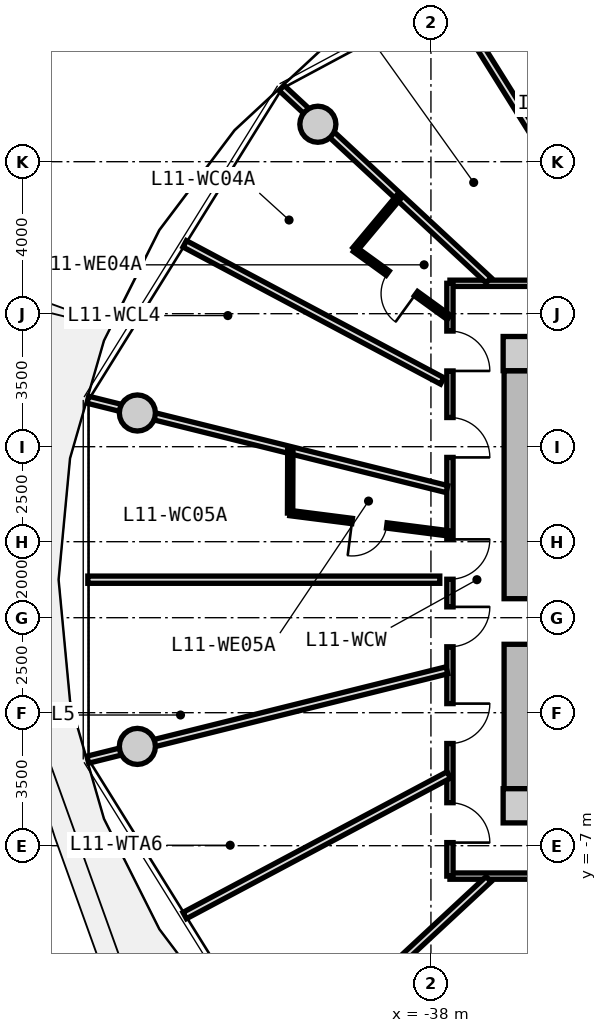
"""IFC4 building model, lengths in metres.
Left out: names, types, materials, properties, quantities, classifications, styles, units other than length and angle.
Written with IfcOpenShell. Run it as: python <this file> out.ifc"""

import sys

from ifc_helpers import new_model, si_unit, direction, frame, frame_2d, origin, origin_2d, place, context, subcontext, project, spatial, rectangle, circle, extrude, source, transform, mapped, element, fill, save


model = new_model("IFC4")
c1 = context("Model", 3, precision=1e-05, world=origin(), true_north=direction((0.0, 1.0)))
c2 = subcontext(c1, "Body", "Model", "MODEL_VIEW")
j1 = project(units=[si_unit("LENGTHUNIT", "METRE"), si_unit("PLANEANGLEUNIT", "RADIAN")], contexts=[c1])
p1 = place(None, origin())
s1 = spatial("IfcSite", under=j1, at=p1, CompositionType="ELEMENT")
p2 = place(p1, origin())
s2 = spatial("IfcBuilding", under=s1, at=p2, CompositionType="ELEMENT")
p3 = place(p2, frame((0.0, 0.0, 39.9)))
s3 = spatial("IfcBuildingStorey", under=s2, at=p3, CompositionType="ELEMENT", Elevation=39.9)
m1 = source(origin(), c2, "Body", "SweptSolid", [
    extrude(rectangle(XDim=0.9, YDim=0.9, at=origin_2d()), origin(), (0.0, 0.0, 1.0), 3.05),
])
for number, where, z_axis, x_axis in (
    (1, (-35.65, -5.95, 0.0), (0.0, 0.0, 1.0), (1.0, 0.0, 0.0)),
    (2, (-35.65, 5.95, 0.0), (0.0, 0.0, 1.0), (1.0, 0.0, 0.0)),
):
    element("IfcColumn", number, at=place(p3, frame(where, z_axis=z_axis, x_axis=x_axis)), inside=s3, PredefinedType="COLUMN", context=c2, shape_type="MappedRepresentation", body=[
        mapped(m1, transform((0.0, 0.0, 0.0), x_axis=(1.0, 0.0, 0.0), y_axis=(0.0, 1.0, 0.0), z_axis=(0.0, 0.0, 1.0), scale=1.0)),
    ])
m2 = source(origin(), c2, "Body", "SweptSolid", [
    extrude(rectangle(XDim=11.0, YDim=0.85, at=frame_2d((5.5, 0.0))), origin(), (0.0, 0.0, 1.0), 2.79),
])
p4 = place(p3, frame((-35.65, -5.5, 0.0), z_axis=(0.0, 0.0, 1.0), x_axis=(0.0, 1.0, 0.0)))
e3 = element("IfcWall", 3, at=p4, inside=s3, PredefinedType="SHEAR", context=c2, shape_type="MappedRepresentation", body=[
    mapped(m2, transform((0.0, 0.0, 0.0), x_axis=(1.0, 0.0, 0.0), y_axis=(0.0, 1.0, 0.0), z_axis=(0.0, 0.0, 1.0), scale=1.0)),
])
p5 = place(p4, frame((3.8, 0.0, 0.0)))
e4 = element("IfcOpeningElement", 4, at=p5, cuts=e3, PredefinedType="OPENING", context=c2, shape_type="SweptSolid", body=[
    extrude(rectangle(XDim=1.2, YDim=2.15, at=frame_2d((0.6, 1.075))), frame((0.0, 0.435, 0.0), z_axis=(0.0, -1.0, 0.0), x_axis=(1.0, 0.0, 0.0)), (0.0, 0.0, 1.0), 0.87),
])
m3 = source(origin(), c2, "Body", "SweptSolid", [
    extrude(circle(Radius=0.475, at=origin_2d()), origin(), (0.0, 0.0, 1.0), 3.05),
])
for number, where, z_axis, x_axis in (
    (5, (-40.975, 11.985, 0.0), (0.0, 0.0, 1.0), (1.0, 0.0, 0.0)),
    (6, (-45.725, 4.387, 0.0), (0.0, 0.0, 1.0), (1.0, 0.0, 0.0)),
    (7, (-45.725, -4.387, 0.0), (0.0, 0.0, 1.0), (1.0, 0.0, 0.0)),
):
    element("IfcColumn", number, at=place(p3, frame(where, z_axis=z_axis, x_axis=x_axis)), inside=s3, PredefinedType="COLUMN", context=c2, shape_type="MappedRepresentation", body=[
        mapped(m3, transform((0.0, 0.0, 0.0), x_axis=(1.0, 0.0, 0.0), y_axis=(0.0, 1.0, 0.0), z_axis=(0.0, 0.0, 1.0), scale=1.0)),
    ])
m4 = source(origin(), c2, "Body", "SweptSolid", [
    extrude(rectangle(XDim=19.0, YDim=0.165, at=frame_2d((9.5, 0.0))), origin(), (0.0, 0.0, 1.0), 2.775),
])
p6 = place(p3, frame((-37.5, 7.8, 0.0), z_axis=(0.0, 0.0, 1.0), x_axis=(1.0, 0.0, 0.0)))
e8 = element("IfcWall", 8, at=p6, inside=s3, PredefinedType="PARTITIONING", context=c2, shape_type="MappedRepresentation", body=[
    mapped(m4, transform((0.0, 0.0, 0.0), x_axis=(1.0, 0.0, 0.0), y_axis=(0.0, 1.0, 0.0), z_axis=(0.0, 0.0, 1.0), scale=1.0)),
])
p7 = place(p6, frame((4.773, 0.0, 0.0)))
e9 = element("IfcOpeningElement", 9, at=p7, cuts=e8, PredefinedType="OPENING", context=c2, shape_type="SweptSolid", body=[
    extrude(rectangle(XDim=1.05, YDim=2.15, at=frame_2d((0.525, 1.075))), frame((0.0, 0.093, 0.0), z_axis=(0.0, -1.0, 0.0), x_axis=(1.0, 0.0, 0.0)), (0.0, 0.0, 1.0), 0.185),
])
p8 = place(p6, frame((2.251, 0.0, 0.0)))
e10 = element("IfcOpeningElement", 10, at=p8, cuts=e8, PredefinedType="OPENING", context=c2, shape_type="SweptSolid", body=[
    extrude(rectangle(XDim=1.05, YDim=2.15, at=frame_2d((0.525, 1.075))), frame((0.0, 0.093, 0.0), z_axis=(0.0, -1.0, 0.0), x_axis=(1.0, 0.0, 0.0)), (0.0, 0.0, 1.0), 0.185),
])
p9 = place(p6, frame((14.653, 0.0, 0.0)))
e11 = element("IfcOpeningElement", 11, at=p9, cuts=e8, PredefinedType="OPENING", context=c2, shape_type="SweptSolid", body=[
    extrude(rectangle(XDim=1.05, YDim=2.15, at=frame_2d((0.525, 1.075))), frame((0.0, 0.093, 0.0), z_axis=(0.0, -1.0, 0.0), x_axis=(1.0, 0.0, 0.0)), (0.0, 0.0, 1.0), 0.185),
])
p10 = place(p6, frame((12.5, 0.0, 0.0)))
e12 = element("IfcOpeningElement", 12, at=p10, cuts=e8, PredefinedType="OPENING", context=c2, shape_type="SweptSolid", body=[
    extrude(rectangle(XDim=1.05, YDim=2.15, at=frame_2d((0.525, 1.075))), frame((0.0, 0.093, 0.0), z_axis=(0.0, -1.0, 0.0), x_axis=(1.0, 0.0, 0.0)), (0.0, 0.0, 1.0), 0.185),
])
p11 = place(p6, frame((9.352, 0.0, 0.0)))
e13 = element("IfcOpeningElement", 13, at=p11, cuts=e8, PredefinedType="OPENING", context=c2, shape_type="SweptSolid", body=[
    extrude(rectangle(XDim=1.05, YDim=2.15, at=frame_2d((0.525, 1.075))), frame((0.0, 0.093, 0.0), z_axis=(0.0, -1.0, 0.0), x_axis=(1.0, 0.0, 0.0)), (0.0, 0.0, 1.0), 0.185),
])
p12 = place(p6, frame((7.806, 0.0, 0.0)))
e14 = element("IfcOpeningElement", 14, at=p12, cuts=e8, PredefinedType="OPENING", context=c2, shape_type="SweptSolid", body=[
    extrude(rectangle(XDim=1.05, YDim=2.15, at=frame_2d((0.525, 1.075))), frame((0.0, 0.093, 0.0), z_axis=(0.0, -1.0, 0.0), x_axis=(1.0, 0.0, 0.0)), (0.0, 0.0, 1.0), 0.185),
])
p13 = place(p3, frame((-18.5, -7.8, 0.0), z_axis=(0.0, 0.0, 1.0), x_axis=(-1.0, 0.0, 0.0)))
e15 = element("IfcWall", 15, at=p13, inside=s3, PredefinedType="PARTITIONING", context=c2, shape_type="MappedRepresentation", body=[
    mapped(m4, transform((0.0, 0.0, 0.0), x_axis=(1.0, 0.0, 0.0), y_axis=(0.0, 1.0, 0.0), z_axis=(0.0, 0.0, 1.0), scale=1.0)),
])
p14 = place(p13, frame((15.652, 0.0, 0.0)))
e16 = element("IfcOpeningElement", 16, at=p14, cuts=e15, PredefinedType="OPENING", context=c2, shape_type="SweptSolid", body=[
    extrude(rectangle(XDim=1.05, YDim=2.15, at=frame_2d((0.525, 1.075))), frame((0.0, 0.093, 0.0), z_axis=(0.0, -1.0, 0.0), x_axis=(1.0, 0.0, 0.0)), (0.0, 0.0, 1.0), 0.185),
])
p15 = place(p13, frame((12.5, 0.0, 0.0)))
e17 = element("IfcOpeningElement", 17, at=p15, cuts=e15, PredefinedType="OPENING", context=c2, shape_type="SweptSolid", body=[
    extrude(rectangle(XDim=1.05, YDim=2.15, at=frame_2d((0.525, 1.075))), frame((0.0, 0.093, 0.0), z_axis=(0.0, -1.0, 0.0), x_axis=(1.0, 0.0, 0.0)), (0.0, 0.0, 1.0), 0.185),
])
p16 = place(p13, frame((10.104, 0.0, 0.0)))
e18 = element("IfcOpeningElement", 18, at=p16, cuts=e15, PredefinedType="OPENING", context=c2, shape_type="SweptSolid", body=[
    extrude(rectangle(XDim=1.05, YDim=2.15, at=frame_2d((0.525, 1.075))), frame((0.0, 0.093, 0.0), z_axis=(0.0, -1.0, 0.0), x_axis=(1.0, 0.0, 0.0)), (0.0, 0.0, 1.0), 0.185),
])
p17 = place(p13, frame((7.806, 0.0, 0.0)))
e19 = element("IfcOpeningElement", 19, at=p17, cuts=e15, PredefinedType="OPENING", context=c2, shape_type="SweptSolid", body=[
    extrude(rectangle(XDim=1.05, YDim=2.15, at=frame_2d((0.525, 1.075))), frame((0.0, 0.093, 0.0), z_axis=(0.0, -1.0, 0.0), x_axis=(1.0, 0.0, 0.0)), (0.0, 0.0, 1.0), 0.185),
])
p18 = place(p13, frame((5.915, 0.0, 0.0)))
e20 = element("IfcOpeningElement", 20, at=p18, cuts=e15, PredefinedType="OPENING", context=c2, shape_type="SweptSolid", body=[
    extrude(rectangle(XDim=0.92, YDim=2.1, at=frame_2d((0.46, 1.05))), frame((0.0, 0.093, 0.0), z_axis=(0.0, -1.0, 0.0), x_axis=(1.0, 0.0, 0.0)), (0.0, 0.0, 1.0), 0.185),
])
p19 = place(p13, frame((2.769, 0.0, 0.0)))
e21 = element("IfcOpeningElement", 21, at=p19, cuts=e15, PredefinedType="OPENING", context=c2, shape_type="SweptSolid", body=[
    extrude(rectangle(XDim=0.92, YDim=2.1, at=frame_2d((0.46, 1.05))), frame((0.0, 0.093, 0.0), z_axis=(0.0, -1.0, 0.0), x_axis=(1.0, 0.0, 0.0)), (0.0, 0.0, 1.0), 0.185),
])
m5 = source(origin(), c2, "Body", "SweptSolid", [
    extrude(rectangle(XDim=15.6, YDim=0.165, at=frame_2d((7.8, 0.0))), origin(), (0.0, 0.0, 1.0), 2.775),
])
p20 = place(p3, frame((-37.5, -7.8, 0.0), z_axis=(0.0, 0.0, 1.0), x_axis=(0.0, 1.0, 0.0)))
e22 = element("IfcWall", 22, at=p20, inside=s3, PredefinedType="PARTITIONING", context=c2, shape_type="MappedRepresentation", body=[
    mapped(m5, transform((0.0, 0.0, 0.0), x_axis=(1.0, 0.0, 0.0), y_axis=(0.0, 1.0, 0.0), z_axis=(0.0, 0.0, 1.0), scale=1.0)),
])
p21 = place(p20, frame((13.293, 0.0, 0.0)))
e23 = element("IfcOpeningElement", 23, at=p21, cuts=e22, PredefinedType="OPENING", context=c2, shape_type="SweptSolid", body=[
    extrude(rectangle(XDim=1.05, YDim=2.15, at=frame_2d((0.525, 1.075))), frame((0.0, 0.093, 0.0), z_axis=(0.0, -1.0, 0.0), x_axis=(1.0, 0.0, 0.0)), (0.0, 0.0, 1.0), 0.185),
])
p22 = place(p20, frame((11.018, 0.0, 0.0)))
e24 = element("IfcOpeningElement", 24, at=p22, cuts=e22, PredefinedType="OPENING", context=c2, shape_type="SweptSolid", body=[
    extrude(rectangle(XDim=1.05, YDim=2.15, at=frame_2d((0.525, 1.075))), frame((0.0, 0.093, 0.0), z_axis=(0.0, -1.0, 0.0), x_axis=(1.0, 0.0, 0.0)), (0.0, 0.0, 1.0), 0.185),
])
p23 = place(p20, frame((7.812, 0.0, 0.0)))
e25 = element("IfcOpeningElement", 25, at=p23, cuts=e22, PredefinedType="OPENING", context=c2, shape_type="SweptSolid", body=[
    extrude(rectangle(XDim=1.05, YDim=2.15, at=frame_2d((0.525, 1.075))), frame((0.0, 0.093, 0.0), z_axis=(0.0, -1.0, 0.0), x_axis=(1.0, 0.0, 0.0)), (0.0, 0.0, 1.0), 0.185),
])
p24 = place(p20, frame((6.035, 0.0, 0.0)))
e26 = element("IfcOpeningElement", 26, at=p24, cuts=e22, PredefinedType="OPENING", context=c2, shape_type="SweptSolid", body=[
    extrude(rectangle(XDim=1.05, YDim=2.15, at=frame_2d((0.525, 1.075))), frame((0.0, 0.093, 0.0), z_axis=(0.0, -1.0, 0.0), x_axis=(1.0, 0.0, 0.0)), (0.0, 0.0, 1.0), 0.185),
])
p25 = place(p20, frame((3.489, 0.0, 0.0)))
e27 = element("IfcOpeningElement", 27, at=p25, cuts=e22, PredefinedType="OPENING", context=c2, shape_type="SweptSolid", body=[
    extrude(rectangle(XDim=1.05, YDim=2.15, at=frame_2d((0.525, 1.075))), frame((0.0, 0.093, 0.0), z_axis=(0.0, -1.0, 0.0), x_axis=(1.0, 0.0, 0.0)), (0.0, 0.0, 1.0), 0.185),
])
p26 = place(p20, frame((0.882, 0.0, 0.0)))
e28 = element("IfcOpeningElement", 28, at=p26, cuts=e22, PredefinedType="OPENING", context=c2, shape_type="SweptSolid", body=[
    extrude(rectangle(XDim=1.05, YDim=2.15, at=frame_2d((0.525, 1.075))), frame((0.0, 0.093, 0.0), z_axis=(0.0, -1.0, 0.0), x_axis=(1.0, 0.0, 0.0)), (0.0, 0.0, 1.0), 0.185),
])
m6 = source(origin(), c2, "Body", "SweptSolid", [
    extrude(rectangle(XDim=7.435, YDim=0.19, at=frame_2d((3.717, 0.0))), origin(), (0.0, 0.0, 1.0), 2.225),
])
p27 = place(p3, frame((-36.483, 7.88, 0.0), z_axis=(0.0, 0.0, 1.0), x_axis=(-0.732651956848, 0.680603489652, 0.0)))
e29 = element("IfcWall", 29, at=p27, inside=s3, PredefinedType="PARTITIONING", context=c2, shape_type="MappedRepresentation", body=[
    mapped(m6, transform((0.0, 0.0, 0.0), x_axis=(1.0, 0.0, 0.0), y_axis=(0.0, 1.0, 0.0), z_axis=(0.0, 0.0, 1.0), scale=1.0)),
])
m7 = source(origin(), c2, "Body", "SweptSolid", [
    extrude(rectangle(XDim=8.598, YDim=0.19, at=frame_2d((4.299, 0.0))), origin(), (0.0, 0.0, 1.0), 2.775),
])
p28 = place(p3, frame((-32.957, 8.017, 0.0), z_axis=(0.0, 0.0, 1.0), x_axis=(-0.530039776395, 0.847972779893, 0.0)))
e30 = element("IfcWall", 30, at=p28, inside=s3, PredefinedType="PARTITIONING", context=c2, shape_type="MappedRepresentation", body=[
    mapped(m7, transform((0.0, 0.0, 0.0), x_axis=(1.0, 0.0, 0.0), y_axis=(0.0, 1.0, 0.0), z_axis=(0.0, 0.0, 1.0), scale=1.0)),
])
m8 = source(origin(), c2, "Body", "SweptSolid", [
    extrude(rectangle(XDim=9.737, YDim=0.19, at=frame_2d((4.869, 0.0))), origin(), (0.0, 0.0, 1.0), 2.225),
])
p29 = place(p3, frame((-37.58, 2.385, 0.0), z_axis=(0.0, 0.0, 1.0), x_axis=(-0.970392716238, 0.241532557375, 0.0)))
e31 = element("IfcWall", 31, at=p29, inside=s3, PredefinedType="PARTITIONING", context=c2, shape_type="MappedRepresentation", body=[
    mapped(m8, transform((0.0, 0.0, 0.0), x_axis=(1.0, 0.0, 0.0), y_axis=(0.0, 1.0, 0.0), z_axis=(0.0, 0.0, 1.0), scale=1.0)),
])
m9 = source(origin(), c2, "Body", "SweptSolid", [
    extrude(rectangle(XDim=7.677, YDim=0.19, at=frame_2d((3.838, 0.0))), origin(), (0.0, 0.0, 1.0), 2.775),
])
p30 = place(p3, frame((-37.703, 5.231, 0.0), z_axis=(0.0, 0.0, 1.0), x_axis=(-0.882725057546, 0.469889851753, 0.0)))
e32 = element("IfcWall", 32, at=p30, inside=s3, PredefinedType="PARTITIONING", context=c2, shape_type="MappedRepresentation", body=[
    mapped(m9, transform((0.0, 0.0, 0.0), x_axis=(1.0, 0.0, 0.0), y_axis=(0.0, 1.0, 0.0), z_axis=(0.0, 0.0, 1.0), scale=1.0)),
])
m10 = source(origin(), c2, "Body", "SweptSolid", [
    extrude(rectangle(XDim=3.051, YDim=0.14, at=frame_2d((1.525, 0.0))), origin(), (0.0, 0.0, 1.0), 2.775),
])
p31 = place(p3, frame((-37.53, 6.903, 0.0), z_axis=(0.0, 0.0, 1.0), x_axis=(-0.809849031404, 0.586638343729, 0.0)))
e33 = element("IfcWall", 33, at=p31, inside=s3, PredefinedType="PARTITIONING", context=c2, shape_type="MappedRepresentation", body=[
    mapped(m10, transform((0.0, 0.0, 0.0), x_axis=(1.0, 0.0, 0.0), y_axis=(0.0, 1.0, 0.0), z_axis=(0.0, 0.0, 1.0), scale=1.0)),
])
p32 = place(p31, frame((1.065, 0.0, 0.0)))
e34 = element("IfcOpeningElement", 34, at=p32, cuts=e33, PredefinedType="OPENING", context=c2, shape_type="SweptSolid", body=[
    extrude(rectangle(XDim=0.92, YDim=2.1, at=frame_2d((0.46, 1.05))), frame((0.0, 0.08, 0.0), z_axis=(0.0, -1.0, 0.0), x_axis=(1.0, 0.0, 0.0)), (0.0, 0.0, 1.0), 0.16),
])
m11 = source(origin(), c2, "Body", "SweptSolid", [
    extrude(rectangle(XDim=1.84, YDim=0.14, at=frame_2d((0.92, 0.0))), origin(), (0.0, 0.0, 1.0), 2.415),
])
p33 = place(p3, frame((-40.0, 8.692, 0.0), z_axis=(0.0, 0.0, 1.0), x_axis=(0.641410397049, 0.767197955262, 0.0)))
e35 = element("IfcWall", 35, at=p33, inside=s3, PredefinedType="PARTITIONING", context=c2, shape_type="MappedRepresentation", body=[
    mapped(m11, transform((0.0, 0.0, 0.0), x_axis=(1.0, 0.0, 0.0), y_axis=(0.0, 1.0, 0.0), z_axis=(0.0, 0.0, 1.0), scale=1.0)),
])
p34 = place(p3, frame((-37.58, -2.385, 0.0), z_axis=(0.0, 0.0, 1.0), x_axis=(-0.970392716238, -0.241532557375, 0.0)))
e36 = element("IfcWall", 36, at=p34, inside=s3, PredefinedType="PARTITIONING", context=c2, shape_type="MappedRepresentation", body=[
    mapped(m8, transform((0.0, 0.0, 0.0), x_axis=(1.0, 0.0, 0.0), y_axis=(0.0, 1.0, 0.0), z_axis=(0.0, 0.0, 1.0), scale=1.0)),
])
m12 = source(origin(), c2, "Body", "SweptSolid", [
    extrude(rectangle(XDim=9.261, YDim=0.19, at=frame_2d((4.631, 0.0))), origin(), (0.0, 0.0, 1.0), 2.775),
])
p35 = place(p3, frame((-37.767, 0.0, 0.0), z_axis=(0.0, 0.0, 1.0), x_axis=(-1.0, 0.0, 0.0)))
e37 = element("IfcWall", 37, at=p35, inside=s3, PredefinedType="PARTITIONING", context=c2, shape_type="MappedRepresentation", body=[
    mapped(m12, transform((0.0, 0.0, 0.0), x_axis=(1.0, 0.0, 0.0), y_axis=(0.0, 1.0, 0.0), z_axis=(0.0, 0.0, 1.0), scale=1.0)),
])
m13 = source(origin(), c2, "Body", "SweptSolid", [
    extrude(rectangle(XDim=4.21, YDim=0.14, at=frame_2d((2.105, 0.0))), origin(), (0.0, 0.0, 1.0), 2.775),
])
p36 = place(p3, frame((-37.53, 1.219, 0.0), z_axis=(0.0, 0.0, 1.0), x_axis=(-0.991917821325, 0.126881975625, 0.0)))
e38 = element("IfcWall", 38, at=p36, inside=s3, PredefinedType="PARTITIONING", context=c2, shape_type="MappedRepresentation", body=[
    mapped(m13, transform((0.0, 0.0, 0.0), x_axis=(1.0, 0.0, 0.0), y_axis=(0.0, 1.0, 0.0), z_axis=(0.0, 0.0, 1.0), scale=1.0)),
])
p37 = place(p36, frame((1.645, 0.0, 0.0)))
e39 = element("IfcOpeningElement", 39, at=p37, cuts=e38, PredefinedType="OPENING", context=c2, shape_type="SweptSolid", body=[
    extrude(rectangle(XDim=0.92, YDim=2.1, at=frame_2d((0.46, 1.05))), frame((0.0, 0.08, 0.0), z_axis=(0.0, -1.0, 0.0), x_axis=(1.0, 0.0, 0.0)), (0.0, 0.0, 1.0), 0.16),
])
m14 = source(origin(), c2, "Body", "SweptSolid", [
    extrude(rectangle(XDim=1.675, YDim=0.14, at=frame_2d((0.837, 0.0))), origin(), (0.0, 0.0, 1.0), 2.775),
])
p38 = place(p3, frame((-41.706, 1.753, 0.0), z_axis=(0.0, 0.0, 1.0), x_axis=(0.003644821977, 0.999993357614, 0.0)))
e40 = element("IfcWall", 40, at=p38, inside=s3, PredefinedType="PARTITIONING", context=c2, shape_type="MappedRepresentation", body=[
    mapped(m14, transform((0.0, 0.0, 0.0), x_axis=(1.0, 0.0, 0.0), y_axis=(0.0, 1.0, 0.0), z_axis=(0.0, 0.0, 1.0), scale=1.0)),
])
p39 = place(p3, frame((-36.483, -7.88, 0.0), z_axis=(0.0, 0.0, 1.0), x_axis=(-0.732651956848, -0.680603489652, 0.0)))
e41 = element("IfcWall", 41, at=p39, inside=s3, PredefinedType="PARTITIONING", context=c2, shape_type="MappedRepresentation", body=[
    mapped(m6, transform((0.0, 0.0, 0.0), x_axis=(1.0, 0.0, 0.0), y_axis=(0.0, 1.0, 0.0), z_axis=(0.0, 0.0, 1.0), scale=1.0)),
])
m15 = source(origin(), c2, "Body", "SweptSolid", [
    extrude(rectangle(XDim=7.873, YDim=0.19, at=frame_2d((3.937, 0.0))), origin(), (0.0, 0.0, 1.0), 2.775),
])
p40 = place(p3, frame((-37.53, -5.138, 0.0), z_axis=(0.0, 0.0, 1.0), x_axis=(-0.882666052726, -0.470000680175, 0.0)))
e42 = element("IfcWall", 42, at=p40, inside=s3, PredefinedType="PARTITIONING", context=c2, shape_type="MappedRepresentation", body=[
    mapped(m15, transform((0.0, 0.0, 0.0), x_axis=(1.0, 0.0, 0.0), y_axis=(0.0, 1.0, 0.0), z_axis=(0.0, 0.0, 1.0), scale=1.0)),
])
m16 = source(origin(), c2, "Body", "SweptSolid", [
    extrude(rectangle(XDim=8.818, YDim=0.19, at=frame_2d((4.409, 0.0))), origin(), (0.0, 0.0, 1.0), 2.775),
])
p41 = place(p3, frame((-32.841, -7.83, 0.0), z_axis=(0.0, 0.0, 1.0), x_axis=(-0.529931746109, -0.848040296487, 0.0)))
e43 = element("IfcWall", 43, at=p41, inside=s3, PredefinedType="PARTITIONING", context=c2, shape_type="MappedRepresentation", body=[
    mapped(m16, transform((0.0, 0.0, 0.0), x_axis=(1.0, 0.0, 0.0), y_axis=(0.0, 1.0, 0.0), z_axis=(0.0, 0.0, 1.0), scale=1.0)),
])
m17 = source(origin(), c2, "Body", "SweptSolid", [
    extrude(rectangle(XDim=1.2, YDim=2.15, at=frame_2d((0.6, 1.075))), frame((0.0, 0.025, 0.0), z_axis=(0.0, -1.0, 0.0), x_axis=(1.0, 0.0, 0.0)), (0.0, 0.0, 1.0), 0.05),
])
p42 = place(p5, frame((1.2, 0.0, 0.0), z_axis=(0.0, 0.0, 1.0), x_axis=(-1.0, 0.0, 0.0)))
e44 = element("IfcDoor", 44, at=p42, inside=s3, OperationType="SINGLE_SWING_LEFT", PredefinedType="DOOR", context=c2, shape_type="MappedRepresentation", body=[
    mapped(m17, transform((0.0, 0.0, 0.0), x_axis=(1.0, 0.0, 0.0), y_axis=(0.0, 1.0, 0.0), z_axis=(0.0, 0.0, 1.0), scale=1.0)),
])
fill(e4, e44)
m18 = source(origin(), c2, "Body", "SweptSolid", [
    extrude(rectangle(XDim=1.05, YDim=2.15, at=frame_2d((0.525, 1.075))), frame((0.0, 0.025, 0.0), z_axis=(0.0, -1.0, 0.0), x_axis=(1.0, 0.0, 0.0)), (0.0, 0.0, 1.0), 0.05),
])
p43 = place(p21, frame((1.05, 0.0, 0.0), z_axis=(0.0, 0.0, 1.0), x_axis=(-1.0, 0.0, 0.0)))
e45 = element("IfcDoor", 45, at=p43, inside=s3, OperationType="SINGLE_SWING_RIGHT", PredefinedType="DOOR", context=c2, shape_type="MappedRepresentation", body=[
    mapped(m18, transform((0.0, 0.0, 0.0), x_axis=(1.0, 0.0, 0.0), y_axis=(0.0, 1.0, 0.0), z_axis=(0.0, 0.0, 1.0), scale=1.0)),
])
fill(e23, e45)
m19 = source(origin(), c2, "Body", "SweptSolid", [
    extrude(rectangle(XDim=0.92, YDim=2.1, at=frame_2d((0.46, 1.05))), frame((0.0, 0.025, 0.0), z_axis=(0.0, -1.0, 0.0), x_axis=(1.0, 0.0, 0.0)), (0.0, 0.0, 1.0), 0.05),
])
p44 = place(p32, origin())
e46 = element("IfcDoor", 46, at=p44, inside=s3, OperationType="SINGLE_SWING_LEFT", PredefinedType="DOOR", context=c2, shape_type="MappedRepresentation", body=[
    mapped(m19, transform((0.0, 0.0, 0.0), x_axis=(1.0, 0.0, 0.0), y_axis=(0.0, 1.0, 0.0), z_axis=(0.0, 0.0, 1.0), scale=1.0)),
])
fill(e34, e46)
p45 = place(p22, frame((1.05, 0.0, 0.0), z_axis=(0.0, 0.0, 1.0), x_axis=(-1.0, 0.0, 0.0)))
e47 = element("IfcDoor", 47, at=p45, inside=s3, OperationType="SINGLE_SWING_RIGHT", PredefinedType="DOOR", context=c2, shape_type="MappedRepresentation", body=[
    mapped(m18, transform((0.0, 0.0, 0.0), x_axis=(1.0, 0.0, 0.0), y_axis=(0.0, 1.0, 0.0), z_axis=(0.0, 0.0, 1.0), scale=1.0)),
])
fill(e24, e47)
p46 = place(p23, frame((1.05, 0.0, 0.0), z_axis=(0.0, 0.0, 1.0), x_axis=(-1.0, 0.0, 0.0)))
e48 = element("IfcDoor", 48, at=p46, inside=s3, OperationType="SINGLE_SWING_LEFT", PredefinedType="DOOR", context=c2, shape_type="MappedRepresentation", body=[
    mapped(m18, transform((0.0, 0.0, 0.0), x_axis=(1.0, 0.0, 0.0), y_axis=(0.0, 1.0, 0.0), z_axis=(0.0, 0.0, 1.0), scale=1.0)),
])
fill(e25, e48)
p47 = place(p37, origin())
e49 = element("IfcDoor", 49, at=p47, inside=s3, OperationType="SINGLE_SWING_RIGHT", PredefinedType="DOOR", context=c2, shape_type="MappedRepresentation", body=[
    mapped(m19, transform((0.0, 0.0, 0.0), x_axis=(1.0, 0.0, 0.0), y_axis=(0.0, 1.0, 0.0), z_axis=(0.0, 0.0, 1.0), scale=1.0)),
])
fill(e39, e49)
p48 = place(p24, frame((1.05, 0.0, 0.0), z_axis=(0.0, 0.0, 1.0), x_axis=(-1.0, 0.0, 0.0)))
e50 = element("IfcDoor", 50, at=p48, inside=s3, OperationType="SINGLE_SWING_LEFT", PredefinedType="DOOR", context=c2, shape_type="MappedRepresentation", body=[
    mapped(m18, transform((0.0, 0.0, 0.0), x_axis=(1.0, 0.0, 0.0), y_axis=(0.0, 1.0, 0.0), z_axis=(0.0, 0.0, 1.0), scale=1.0)),
])
fill(e26, e50)
p49 = place(p25, frame((1.05, 0.0, 0.0), z_axis=(0.0, 0.0, 1.0), x_axis=(-1.0, 0.0, 0.0)))
e51 = element("IfcDoor", 51, at=p49, inside=s3, OperationType="SINGLE_SWING_LEFT", PredefinedType="DOOR", context=c2, shape_type="MappedRepresentation", body=[
    mapped(m18, transform((0.0, 0.0, 0.0), x_axis=(1.0, 0.0, 0.0), y_axis=(0.0, 1.0, 0.0), z_axis=(0.0, 0.0, 1.0), scale=1.0)),
])
fill(e27, e51)
p50 = place(p26, frame((1.05, 0.0, 0.0), z_axis=(0.0, 0.0, 1.0), x_axis=(-1.0, 0.0, 0.0)))
e52 = element("IfcDoor", 52, at=p50, inside=s3, OperationType="SINGLE_SWING_RIGHT", PredefinedType="DOOR", context=c2, shape_type="MappedRepresentation", body=[
    mapped(m18, transform((0.0, 0.0, 0.0), x_axis=(1.0, 0.0, 0.0), y_axis=(0.0, 1.0, 0.0), z_axis=(0.0, 0.0, 1.0), scale=1.0)),
])
fill(e28, e52)
save(model, sys.argv[1])
